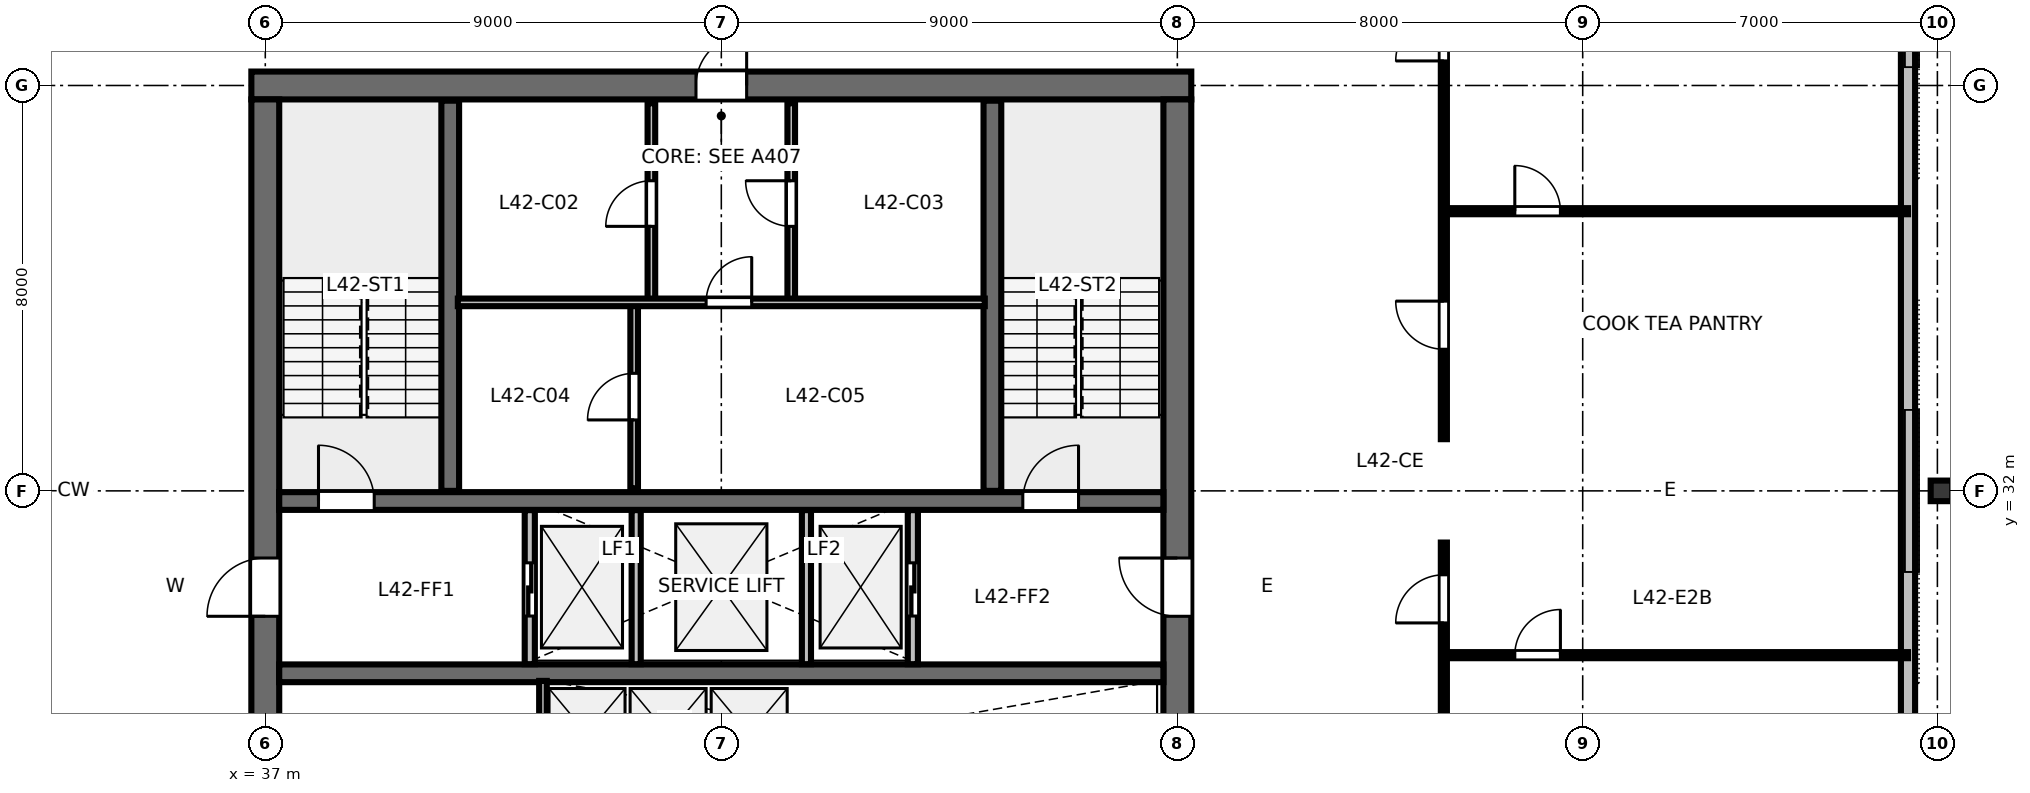
"""IFC4 building model, lengths in metres.
Left out: names, types, materials, properties, quantities, classifications, styles, units other than length and angle.
Written with IfcOpenShell. Run it as: python <this file> out.ifc"""

import sys

from ifc_helpers import new_model, si_unit, direction, frame, frame_2d, origin, origin_2d, place, context, subcontext, project, spatial, rectangle, i_section, extrude, element, fill, save


model = new_model("IFC4")
c1 = context("Model", 3, precision=1e-05, world=origin(), true_north=direction((0.0, 1.0)))
c2 = subcontext(c1, "Body", "Model", "MODEL_VIEW")
j1 = project(units=[si_unit("LENGTHUNIT", "METRE"), si_unit("PLANEANGLEUNIT", "RADIAN")], contexts=[c1])
p1 = place(None, origin())
s1 = spatial("IfcSite", under=j1, at=p1, CompositionType="ELEMENT")
p2 = place(p1, origin())
s2 = spatial("IfcBuilding", under=s1, at=p2, CompositionType="ELEMENT")
p3 = place(p2, frame((0.0, 0.0, 160.0)))
s3 = spatial("IfcBuildingStorey", under=s2, at=p3, CompositionType="ELEMENT", Elevation=160.0)
p4 = place(p3, frame((36.725, 40.0, 0.0), z_axis=(0.0, 0.0, 1.0), x_axis=(1.0, 0.0, 0.0)))
e1 = element("IfcWall", 1, at=p4, inside=s3, PredefinedType="SHEAR", context=c2, shape_type="SweptSolid", body=[
    extrude(rectangle(XDim=18.55, YDim=0.55, at=frame_2d((9.275, 0.0))), origin(), (0.0, 0.0, 1.0), 3.36),
])
p5 = place(p4, frame((8.775, 0.0, 0.0)))
e2 = element("IfcOpeningElement", 2, at=p5, cuts=e1, PredefinedType="OPENING", context=c2, shape_type="SweptSolid", body=[
    extrude(rectangle(XDim=1.0, YDim=2.15, at=frame_2d((0.5, 1.075))), frame((0.0, 0.285, 0.0), z_axis=(0.0, -1.0, 0.0), x_axis=(1.0, 0.0, 0.0)), (0.0, 0.0, 1.0), 0.57),
])
p6 = place(p3, frame((37.0, 24.275, 0.0), z_axis=(0.0, 0.0, 1.0), x_axis=(0.0, 1.0, 0.0)))
e3 = element("IfcWall", 3, at=p6, inside=s3, PredefinedType="SHEAR", context=c2, shape_type="SweptSolid", body=[
    extrude(rectangle(XDim=15.45, YDim=0.55, at=frame_2d((7.725, 0.0))), origin(), (0.0, 0.0, 1.0), 3.36),
])
p7 = place(p6, frame((5.25, 0.0, 0.0)))
e4 = element("IfcOpeningElement", 4, at=p7, cuts=e3, PredefinedType="OPENING", context=c2, shape_type="SweptSolid", body=[
    extrude(rectangle(XDim=1.15, YDim=2.15, at=frame_2d((0.575, 1.075))), frame((0.0, 0.285, 0.0), z_axis=(0.0, -1.0, 0.0), x_axis=(1.0, 0.0, 0.0)), (0.0, 0.0, 1.0), 0.57),
])
p8 = place(p3, frame((55.0, 24.275, 0.0), z_axis=(0.0, 0.0, 1.0), x_axis=(0.0, 1.0, 0.0)))
e5 = element("IfcWall", 5, at=p8, inside=s3, PredefinedType="SHEAR", context=c2, shape_type="SweptSolid", body=[
    extrude(rectangle(XDim=15.45, YDim=0.55, at=frame_2d((7.725, 0.0))), origin(), (0.0, 0.0, 1.0), 3.36),
])
p9 = place(p8, frame((5.25, 0.0, 0.0)))
e6 = element("IfcOpeningElement", 6, at=p9, cuts=e5, PredefinedType="OPENING", context=c2, shape_type="SweptSolid", body=[
    extrude(rectangle(XDim=1.15, YDim=2.15, at=frame_2d((0.575, 1.075))), frame((0.0, 0.285, 0.0), z_axis=(0.0, -1.0, 0.0), x_axis=(1.0, 0.0, 0.0)), (0.0, 0.0, 1.0), 0.57),
])
p10 = place(p3, frame((37.275, 31.8, 0.0), z_axis=(0.0, 0.0, 1.0), x_axis=(1.0, 0.0, 0.0)))
e7 = element("IfcWall", 7, at=p10, inside=s3, PredefinedType="SHEAR", context=c2, shape_type="SweptSolid", body=[
    extrude(rectangle(XDim=17.45, YDim=0.35, at=frame_2d((8.725, 0.0))), origin(), (0.0, 0.0, 1.0), 3.36),
])
p11 = place(p10, frame((0.775, 0.0, 0.0)))
e8 = element("IfcOpeningElement", 8, at=p11, cuts=e7, PredefinedType="OPENING", context=c2, shape_type="SweptSolid", body=[
    extrude(rectangle(XDim=1.1, YDim=2.15, at=frame_2d((0.55, 1.075))), frame((0.0, 0.185, 0.0), z_axis=(0.0, -1.0, 0.0), x_axis=(1.0, 0.0, 0.0)), (0.0, 0.0, 1.0), 0.37),
])
p12 = place(p10, frame((14.675, 0.0, 0.0)))
e9 = element("IfcOpeningElement", 9, at=p12, cuts=e7, PredefinedType="OPENING", context=c2, shape_type="SweptSolid", body=[
    extrude(rectangle(XDim=1.1, YDim=2.15, at=frame_2d((0.55, 1.075))), frame((0.0, 0.185, 0.0), z_axis=(0.0, -1.0, 0.0), x_axis=(1.0, 0.0, 0.0)), (0.0, 0.0, 1.0), 0.37),
])
p13 = place(p3, frame((37.275, 28.4, 0.0), z_axis=(0.0, 0.0, 1.0), x_axis=(1.0, 0.0, 0.0)))
e10 = element("IfcWall", 10, at=p13, inside=s3, PredefinedType="SHEAR", context=c2, shape_type="SweptSolid", body=[
    extrude(rectangle(XDim=17.45, YDim=0.35, at=frame_2d((8.725, 0.0))), origin(), (0.0, 0.0, 1.0), 3.36),
])
p14 = place(p3, frame((70.08, 32.0, 0.0), z_axis=(0.0, 0.0, 1.0), x_axis=(0.0, 1.0, 0.0)))
e11 = element("IfcColumn", 11, at=p14, inside=s3, PredefinedType="COLUMN", context=c2, shape_type="SweptSolid", body=[
    extrude(i_section(OverallWidth=0.406, OverallDepth=0.425, WebThickness=0.033, FlangeThickness=0.052, FilletRadius=0.025, at=origin_2d()), origin(), (0.0, 0.0, 1.0), 3.358),
])
p15 = place(p3, frame((69.42, 16.16, 0.0), z_axis=(0.0, 0.0, 1.0), x_axis=(0.0, 1.0, 0.0)))
e12 = element("IfcWall", 12, at=p15, inside=s3, PredefinedType="STANDARD", context=c2, shape_type="SweptSolid", body=[
    extrude(rectangle(XDim=31.68, YDim=0.28, at=frame_2d((15.84, 0.0))), origin(), (0.0, 0.0, 1.0), 3.36),
])
for number, where, z_axis, x_axis in (
    (13, (40.65, 32.0, 0.0), (0.0, 0.0, 1.0), (0.0, 1.0, 0.0)),
    (14, (51.35, 32.0, 0.0), (0.0, 0.0, 1.0), (0.0, 1.0, 0.0)),
):
    element("IfcWall", number, at=place(p3, frame(where, z_axis=z_axis, x_axis=x_axis)), inside=s3, PredefinedType="SHEAR", context=c2, shape_type="SweptSolid", body=[
        extrude(rectangle(XDim=7.7, YDim=0.35, at=frame_2d((3.85, 0.0))), origin(), (0.0, 0.0, 1.0), 3.6),
    ])
p16 = place(p3, frame((44.62, 35.72, 0.0), z_axis=(0.0, 0.0, 1.0), x_axis=(0.0, 1.0, 0.0)))
e15 = element("IfcWall", 15, at=p16, inside=s3, PredefinedType="PARTITIONING", context=c2, shape_type="SweptSolid", body=[
    extrude(rectangle(XDim=3.93, YDim=0.15, at=frame_2d((1.965, 0.0))), origin(), (0.0, 0.0, 1.0), 3.36),
])
p17 = place(p16, frame((1.5, 0.0, 0.0)))
e16 = element("IfcOpeningElement", 16, at=p17, cuts=e15, PredefinedType="OPENING", context=c2, shape_type="SweptSolid", body=[
    extrude(rectangle(XDim=0.9, YDim=2.15, at=frame_2d((0.45, 1.075))), frame((0.0, 0.085, 0.0), z_axis=(0.0, -1.0, 0.0), x_axis=(1.0, 0.0, 0.0)), (0.0, 0.0, 1.0), 0.17),
])
p18 = place(p3, frame((47.38, 35.72, 0.0), z_axis=(0.0, 0.0, 1.0), x_axis=(0.0, 1.0, 0.0)))
e17 = element("IfcWall", 17, at=p18, inside=s3, PredefinedType="PARTITIONING", context=c2, shape_type="SweptSolid", body=[
    extrude(rectangle(XDim=3.93, YDim=0.15, at=frame_2d((1.965, 0.0))), origin(), (0.0, 0.0, 1.0), 3.36),
])
p19 = place(p18, frame((1.5, 0.0, 0.0)))
e18 = element("IfcOpeningElement", 18, at=p19, cuts=e17, PredefinedType="OPENING", context=c2, shape_type="SweptSolid", body=[
    extrude(rectangle(XDim=0.9, YDim=2.15, at=frame_2d((0.45, 1.075))), frame((0.0, 0.085, 0.0), z_axis=(0.0, -1.0, 0.0), x_axis=(1.0, 0.0, 0.0)), (0.0, 0.0, 1.0), 0.17),
])
p20 = place(p3, frame((44.28, 32.05, 0.0), z_axis=(0.0, 0.0, 1.0), x_axis=(0.0, 1.0, 0.0)))
e19 = element("IfcWall", 19, at=p20, inside=s3, PredefinedType="PARTITIONING", context=c2, shape_type="SweptSolid", body=[
    extrude(rectangle(XDim=3.67, YDim=0.15, at=frame_2d((1.835, 0.0))), origin(), (0.0, 0.0, 1.0), 3.36),
])
p21 = place(p20, frame((1.35, 0.0, 0.0)))
e20 = element("IfcOpeningElement", 20, at=p21, cuts=e19, PredefinedType="OPENING", context=c2, shape_type="SweptSolid", body=[
    extrude(rectangle(XDim=0.92, YDim=2.15, at=frame_2d((0.46, 1.075))), frame((0.0, 0.085, 0.0), z_axis=(0.0, -1.0, 0.0), x_axis=(1.0, 0.0, 0.0)), (0.0, 0.0, 1.0), 0.17),
])
p22 = place(p3, frame((40.8, 35.72, 0.0), z_axis=(0.0, 0.0, 1.0), x_axis=(1.0, 0.0, 0.0)))
e21 = element("IfcWall", 21, at=p22, inside=s3, PredefinedType="PARTITIONING", context=c2, shape_type="SweptSolid", body=[
    extrude(rectangle(XDim=10.4, YDim=0.15, at=frame_2d((5.2, 0.0))), origin(), (0.0, 0.0, 1.0), 3.36),
])
p23 = place(p22, frame((4.9, 0.0, 0.0)))
e22 = element("IfcOpeningElement", 22, at=p23, cuts=e21, PredefinedType="OPENING", context=c2, shape_type="SweptSolid", body=[
    extrude(rectangle(XDim=0.9, YDim=2.15, at=frame_2d((0.45, 1.075))), frame((0.0, 0.085, 0.0), z_axis=(0.0, -1.0, 0.0), x_axis=(1.0, 0.0, 0.0)), (0.0, 0.0, 1.0), 0.17),
])
p24 = place(p3, frame((42.22, 28.58, 0.0), z_axis=(0.0, 0.0, 1.0), x_axis=(0.0, 1.0, 0.0)))
e23 = element("IfcWall", 23, at=p24, inside=s3, PredefinedType="PARTITIONING", context=c2, shape_type="SweptSolid", body=[
    extrude(rectangle(XDim=3.04, YDim=0.2, at=frame_2d((1.52, 0.0))), origin(), (0.0, 0.0, 1.0), 3.36),
])
p25 = place(p24, frame((0.95, 0.0, 0.0)))
e24 = element("IfcOpeningElement", 24, at=p25, cuts=e23, PredefinedType="OPENING", context=c2, shape_type="SweptSolid", body=[
    extrude(rectangle(XDim=1.05, YDim=2.15, at=frame_2d((0.525, 1.075))), frame((0.0, 0.11, 0.0), z_axis=(0.0, -1.0, 0.0), x_axis=(1.0, 0.0, 0.0)), (0.0, 0.0, 1.0), 0.22),
])
p26 = place(p3, frame((49.78, 28.58, 0.0), z_axis=(0.0, 0.0, 1.0), x_axis=(0.0, 1.0, 0.0)))
e25 = element("IfcWall", 25, at=p26, inside=s3, PredefinedType="PARTITIONING", context=c2, shape_type="SweptSolid", body=[
    extrude(rectangle(XDim=3.04, YDim=0.2, at=frame_2d((1.52, 0.0))), origin(), (0.0, 0.0, 1.0), 3.36),
])
p27 = place(p26, frame((0.95, 0.0, 0.0)))
e26 = element("IfcOpeningElement", 26, at=p27, cuts=e25, PredefinedType="OPENING", context=c2, shape_type="SweptSolid", body=[
    extrude(rectangle(XDim=1.05, YDim=2.15, at=frame_2d((0.525, 1.075))), frame((0.0, 0.11, 0.0), z_axis=(0.0, -1.0, 0.0), x_axis=(1.0, 0.0, 0.0)), (0.0, 0.0, 1.0), 0.22),
])
for number, where, z_axis, x_axis in (
    (27, (44.32, 28.58, 0.0), (0.0, 0.0, 1.0), (0.0, 1.0, 0.0)),
    (28, (47.68, 28.58, 0.0), (0.0, 0.0, 1.0), (0.0, 1.0, 0.0)),
):
    element("IfcWall", number, at=place(p3, frame(where, z_axis=z_axis, x_axis=x_axis)), inside=s3, PredefinedType="PARTITIONING", context=c2, shape_type="SweptSolid", body=[
        extrude(rectangle(XDim=3.04, YDim=0.18, at=frame_2d((1.52, 0.0))), origin(), (0.0, 0.0, 1.0), 3.36),
    ])
p28 = place(p3, frame((42.48, 24.35, 0.0), z_axis=(0.0, 0.0, 1.0), x_axis=(0.0, 1.0, 0.0)))
e29 = element("IfcWall", 29, at=p28, inside=s3, PredefinedType="PARTITIONING", context=c2, shape_type="SweptSolid", body=[
    extrude(rectangle(XDim=3.9, YDim=0.15, at=frame_2d((1.95, 0.0))), origin(), (0.0, 0.0, 1.0), 3.36),
])
p29 = place(p28, frame((0.35, 0.0, 0.0)))
e30 = element("IfcOpeningElement", 30, at=p29, cuts=e29, PredefinedType="OPENING", context=c2, shape_type="SweptSolid", body=[
    extrude(rectangle(XDim=0.9, YDim=2.15, at=frame_2d((0.45, 1.075))), frame((0.0, 0.085, 0.0), z_axis=(0.0, -1.0, 0.0), x_axis=(1.0, 0.0, 0.0)), (0.0, 0.0, 1.0), 0.17),
])
p30 = place(p3, frame((60.26, 28.758, 0.0), z_axis=(0.0, 0.0, 1.0), x_axis=(1.0, 0.0, 0.0)))
e31 = element("IfcWall", 31, at=p30, inside=s3, PredefinedType="PARTITIONING", context=c2, shape_type="SweptSolid", body=[
    extrude(rectangle(XDim=9.16, YDim=0.12, at=frame_2d((4.58, 0.0))), origin(), (0.0, 0.0, 1.0), 2.64),
])
p31 = place(p30, frame((1.4, 0.0, 0.0)))
e32 = element("IfcOpeningElement", 32, at=p31, cuts=e31, PredefinedType="OPENING", context=c2, shape_type="SweptSolid", body=[
    extrude(rectangle(XDim=0.9, YDim=2.15, at=frame_2d((0.45, 1.075))), frame((0.0, 0.07, 0.0), z_axis=(0.0, -1.0, 0.0), x_axis=(1.0, 0.0, 0.0)), (0.0, 0.0, 1.0), 0.14),
])
p32 = place(p3, frame((60.26, 37.519, 0.0), z_axis=(0.0, 0.0, 1.0), x_axis=(1.0, 0.0, 0.0)))
e33 = element("IfcWall", 33, at=p32, inside=s3, PredefinedType="PARTITIONING", context=c2, shape_type="SweptSolid", body=[
    extrude(rectangle(XDim=9.16, YDim=0.12, at=frame_2d((4.58, 0.0))), origin(), (0.0, 0.0, 1.0), 2.64),
])
p33 = place(p32, frame((1.4, 0.0, 0.0)))
e34 = element("IfcOpeningElement", 34, at=p33, cuts=e33, PredefinedType="OPENING", context=c2, shape_type="SweptSolid", body=[
    extrude(rectangle(XDim=0.9, YDim=2.15, at=frame_2d((0.45, 1.075))), frame((0.0, 0.07, 0.0), z_axis=(0.0, -1.0, 0.0), x_axis=(1.0, 0.0, 0.0)), (0.0, 0.0, 1.0), 0.14),
])
p34 = place(p3, frame((60.26, 19.4, 0.0), z_axis=(0.0, 0.0, 1.0), x_axis=(0.0, 1.0, 0.0)))
e35 = element("IfcWall", 35, at=p34, inside=s3, PredefinedType="PARTITIONING", context=c2, shape_type="SweptSolid", body=[
    extrude(rectangle(XDim=11.58, YDim=0.12, at=frame_2d((5.79, 0.0))), origin(), (0.0, 0.0, 1.0), 2.64),
])
p35 = place(p34, frame((4.304, 0.0, 0.0)))
e36 = element("IfcOpeningElement", 36, at=p35, cuts=e35, PredefinedType="OPENING", context=c2, shape_type="SweptSolid", body=[
    extrude(rectangle(XDim=0.95, YDim=2.15, at=frame_2d((0.475, 1.075))), frame((0.0, 0.07, 0.0), z_axis=(0.0, -1.0, 0.0), x_axis=(1.0, 0.0, 0.0)), (0.0, 0.0, 1.0), 0.14),
])
p36 = place(p34, frame((9.994, 0.0, 0.0)))
e37 = element("IfcOpeningElement", 37, at=p36, cuts=e35, PredefinedType="OPENING", context=c2, shape_type="SweptSolid", body=[
    extrude(rectangle(XDim=0.95, YDim=2.15, at=frame_2d((0.475, 1.075))), frame((0.0, 0.07, 0.0), z_axis=(0.0, -1.0, 0.0), x_axis=(1.0, 0.0, 0.0)), (0.0, 0.0, 1.0), 0.14),
])
p37 = place(p3, frame((60.26, 33.02, 0.0), z_axis=(0.0, 0.0, 1.0), x_axis=(0.0, 1.0, 0.0)))
e38 = element("IfcWall", 38, at=p37, inside=s3, PredefinedType="PARTITIONING", context=c2, shape_type="SweptSolid", body=[
    extrude(rectangle(XDim=11.58, YDim=0.12, at=frame_2d((5.79, 0.0))), origin(), (0.0, 0.0, 1.0), 2.64),
])
p38 = place(p37, frame((1.775, 0.0, 0.0)))
e39 = element("IfcOpeningElement", 39, at=p38, cuts=e38, PredefinedType="OPENING", context=c2, shape_type="SweptSolid", body=[
    extrude(rectangle(XDim=0.95, YDim=2.15, at=frame_2d((0.475, 1.075))), frame((0.0, 0.07, 0.0), z_axis=(0.0, -1.0, 0.0), x_axis=(1.0, 0.0, 0.0)), (0.0, 0.0, 1.0), 0.14),
])
p39 = place(p37, frame((7.465, 0.0, 0.0)))
e40 = element("IfcOpeningElement", 40, at=p39, cuts=e38, PredefinedType="OPENING", context=c2, shape_type="SweptSolid", body=[
    extrude(rectangle(XDim=0.95, YDim=2.15, at=frame_2d((0.475, 1.075))), frame((0.0, 0.07, 0.0), z_axis=(0.0, -1.0, 0.0), x_axis=(1.0, 0.0, 0.0)), (0.0, 0.0, 1.0), 0.14),
])
p40 = place(p11, origin())
e41 = element("IfcDoor", 41, at=p40, inside=s3, OperationType="SINGLE_SWING_LEFT", PredefinedType="DOOR", context=c2, shape_type="SweptSolid", body=[
    extrude(rectangle(XDim=1.1, YDim=2.15, at=frame_2d((0.55, 1.075))), frame((0.0, 0.025, 0.0), z_axis=(0.0, -1.0, 0.0), x_axis=(1.0, 0.0, 0.0)), (0.0, 0.0, 1.0), 0.05),
])
fill(e8, e41)
p41 = place(p12, origin())
e42 = element("IfcDoor", 42, at=p41, inside=s3, OperationType="SINGLE_SWING_RIGHT", PredefinedType="DOOR", context=c2, shape_type="SweptSolid", body=[
    extrude(rectangle(XDim=1.1, YDim=2.15, at=frame_2d((0.55, 1.075))), frame((0.0, 0.025, 0.0), z_axis=(0.0, -1.0, 0.0), x_axis=(1.0, 0.0, 0.0)), (0.0, 0.0, 1.0), 0.05),
])
fill(e9, e42)
p42 = place(p5, origin())
e43 = element("IfcDoor", 43, at=p42, inside=s3, OperationType="SINGLE_SWING_RIGHT", PredefinedType="DOOR", context=c2, shape_type="SweptSolid", body=[
    extrude(rectangle(XDim=1.0, YDim=2.15, at=frame_2d((0.5, 1.075))), frame((0.0, 0.025, 0.0), z_axis=(0.0, -1.0, 0.0), x_axis=(1.0, 0.0, 0.0)), (0.0, 0.0, 1.0), 0.05),
])
fill(e2, e43)
p43 = place(p7, origin())
e44 = element("IfcDoor", 44, at=p43, inside=s3, OperationType="SINGLE_SWING_LEFT", PredefinedType="DOOR", context=c2, shape_type="SweptSolid", body=[
    extrude(rectangle(XDim=1.15, YDim=2.15, at=frame_2d((0.575, 1.075))), frame((0.0, 0.025, 0.0), z_axis=(0.0, -1.0, 0.0), x_axis=(1.0, 0.0, 0.0)), (0.0, 0.0, 1.0), 0.05),
])
fill(e4, e44)
p44 = place(p9, origin())
e45 = element("IfcDoor", 45, at=p44, inside=s3, OperationType="SINGLE_SWING_RIGHT", PredefinedType="DOOR", context=c2, shape_type="SweptSolid", body=[
    extrude(rectangle(XDim=1.15, YDim=2.15, at=frame_2d((0.575, 1.075))), frame((0.0, 0.025, 0.0), z_axis=(0.0, -1.0, 0.0), x_axis=(1.0, 0.0, 0.0)), (0.0, 0.0, 1.0), 0.05),
])
fill(e6, e45)
p45 = place(p17, origin())
e46 = element("IfcDoor", 46, at=p45, inside=s3, OperationType="SINGLE_SWING_LEFT", PredefinedType="DOOR", context=c2, shape_type="SweptSolid", body=[
    extrude(rectangle(XDim=0.9, YDim=2.15, at=frame_2d((0.45, 1.075))), frame((0.0, 0.025, 0.0), z_axis=(0.0, -1.0, 0.0), x_axis=(1.0, 0.0, 0.0)), (0.0, 0.0, 1.0), 0.05),
])
fill(e16, e46)
p46 = place(p19, origin())
e47 = element("IfcDoor", 47, at=p46, inside=s3, OperationType="SINGLE_SWING_RIGHT", PredefinedType="DOOR", context=c2, shape_type="SweptSolid", body=[
    extrude(rectangle(XDim=0.9, YDim=2.15, at=frame_2d((0.45, 1.075))), frame((0.0, 0.025, 0.0), z_axis=(0.0, -1.0, 0.0), x_axis=(1.0, 0.0, 0.0)), (0.0, 0.0, 1.0), 0.05),
])
fill(e18, e47)
p47 = place(p21, origin())
e48 = element("IfcDoor", 48, at=p47, inside=s3, OperationType="SINGLE_SWING_LEFT", PredefinedType="DOOR", context=c2, shape_type="SweptSolid", body=[
    extrude(rectangle(XDim=0.92, YDim=2.15, at=frame_2d((0.46, 1.075))), frame((0.0, 0.025, 0.0), z_axis=(0.0, -1.0, 0.0), x_axis=(1.0, 0.0, 0.0)), (0.0, 0.0, 1.0), 0.05),
])
fill(e20, e48)
p48 = place(p23, origin())
e49 = element("IfcDoor", 49, at=p48, inside=s3, OperationType="SINGLE_SWING_RIGHT", PredefinedType="DOOR", context=c2, shape_type="SweptSolid", body=[
    extrude(rectangle(XDim=0.9, YDim=2.15, at=frame_2d((0.45, 1.075))), frame((0.0, 0.025, 0.0), z_axis=(0.0, -1.0, 0.0), x_axis=(1.0, 0.0, 0.0)), (0.0, 0.0, 1.0), 0.05),
])
fill(e22, e49)
p49 = place(p25, origin())
e50 = element("IfcDoor", 50, at=p49, inside=s3, OperationType="SLIDING_TO_LEFT", PredefinedType="DOOR", context=c2, shape_type="SweptSolid", body=[
    extrude(rectangle(XDim=1.05, YDim=2.15, at=frame_2d((0.525, 1.075))), frame((0.0, 0.025, 0.0), z_axis=(0.0, -1.0, 0.0), x_axis=(1.0, 0.0, 0.0)), (0.0, 0.0, 1.0), 0.05),
])
fill(e24, e50)
p50 = place(p27, origin())
e51 = element("IfcDoor", 51, at=p50, inside=s3, OperationType="SLIDING_TO_RIGHT", PredefinedType="DOOR", context=c2, shape_type="SweptSolid", body=[
    extrude(rectangle(XDim=1.05, YDim=2.15, at=frame_2d((0.525, 1.075))), frame((0.0, 0.025, 0.0), z_axis=(0.0, -1.0, 0.0), x_axis=(1.0, 0.0, 0.0)), (0.0, 0.0, 1.0), 0.05),
])
fill(e26, e51)
p51 = place(p31, origin())
e52 = element("IfcDoor", 52, at=p51, inside=s3, OperationType="SINGLE_SWING_RIGHT", PredefinedType="DOOR", context=c2, shape_type="SweptSolid", body=[
    extrude(rectangle(XDim=0.9, YDim=2.15, at=frame_2d((0.45, 1.075))), frame((0.0, 0.025, 0.0), z_axis=(0.0, -1.0, 0.0), x_axis=(1.0, 0.0, 0.0)), (0.0, 0.0, 1.0), 0.05),
])
fill(e32, e52)
p52 = place(p33, origin())
e53 = element("IfcDoor", 53, at=p52, inside=s3, OperationType="SINGLE_SWING_LEFT", PredefinedType="DOOR", context=c2, shape_type="SweptSolid", body=[
    extrude(rectangle(XDim=0.9, YDim=2.15, at=frame_2d((0.45, 1.075))), frame((0.0, 0.025, 0.0), z_axis=(0.0, -1.0, 0.0), x_axis=(1.0, 0.0, 0.0)), (0.0, 0.0, 1.0), 0.05),
])
fill(e34, e53)
p53 = place(p36, origin())
e54 = element("IfcDoor", 54, at=p53, inside=s3, OperationType="SINGLE_SWING_LEFT", PredefinedType="DOOR", context=c2, shape_type="SweptSolid", body=[
    extrude(rectangle(XDim=0.95, YDim=2.15, at=frame_2d((0.475, 1.075))), frame((0.0, 0.025, 0.0), z_axis=(0.0, -1.0, 0.0), x_axis=(1.0, 0.0, 0.0)), (0.0, 0.0, 1.0), 0.05),
])
fill(e37, e54)
p54 = place(p38, origin())
e55 = element("IfcDoor", 55, at=p54, inside=s3, OperationType="SINGLE_SWING_RIGHT", PredefinedType="DOOR", context=c2, shape_type="SweptSolid", body=[
    extrude(rectangle(XDim=0.95, YDim=2.15, at=frame_2d((0.475, 1.075))), frame((0.0, 0.025, 0.0), z_axis=(0.0, -1.0, 0.0), x_axis=(1.0, 0.0, 0.0)), (0.0, 0.0, 1.0), 0.05),
])
fill(e39, e55)
p55 = place(p39, origin())
e56 = element("IfcDoor", 56, at=p55, inside=s3, OperationType="SINGLE_SWING_LEFT", PredefinedType="DOOR", context=c2, shape_type="SweptSolid", body=[
    extrude(rectangle(XDim=0.95, YDim=2.15, at=frame_2d((0.475, 1.075))), frame((0.0, 0.025, 0.0), z_axis=(0.0, -1.0, 0.0), x_axis=(1.0, 0.0, 0.0)), (0.0, 0.0, 1.0), 0.05),
])
fill(e40, e56)
save(model, sys.argv[1])
